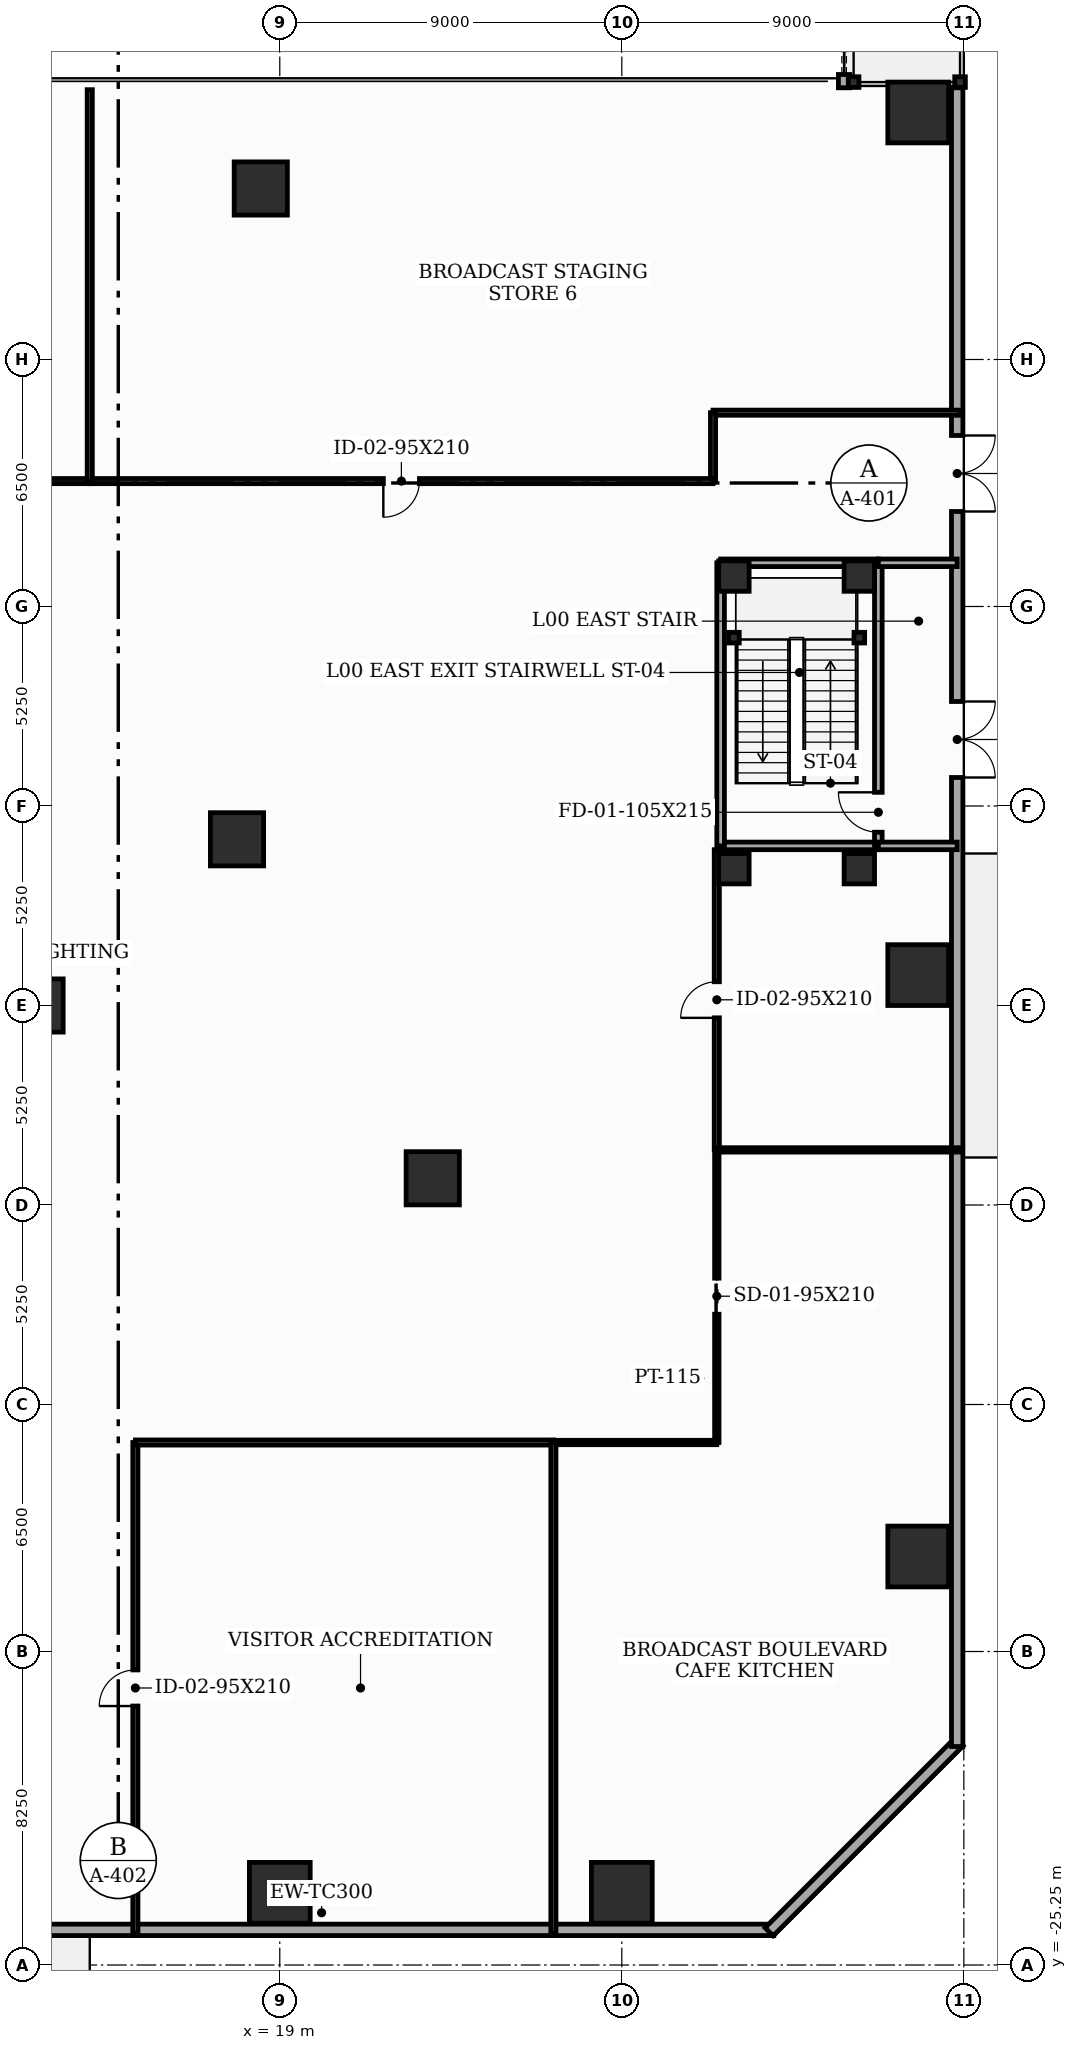
"""IFC4 building model, lengths in metres.
Left out: names, types, materials, properties, quantities, classifications, styles, units other than length and angle.
Written with IfcOpenShell. Run it as: python <this file> out.ifc"""

import sys

from ifc_helpers import new_model, si_unit, direction, frame, frame_2d, origin, origin_2d, place, context, subcontext, project, spatial, rectangle, i_section, extrude, element, fill, save


model = new_model("IFC4")
c1 = context("Model", 3, precision=1e-05, world=origin(), true_north=direction((0.0, 1.0)))
c2 = subcontext(c1, "Body", "Model", "MODEL_VIEW")
j1 = project(units=[si_unit("LENGTHUNIT", "METRE"), si_unit("PLANEANGLEUNIT", "RADIAN")], contexts=[c1])
p1 = place(None, origin())
s1 = spatial("IfcSite", under=j1, at=p1, CompositionType="ELEMENT")
p2 = place(p1, origin())
s2 = spatial("IfcBuilding", under=s1, at=p2, CompositionType="ELEMENT")
p3 = place(p2, origin())
s3 = spatial("IfcBuildingStorey", under=s2, at=p3, CompositionType="ELEMENT", Elevation=0.0)
p4 = place(p3, frame((12.6, 0.0, 0.0), z_axis=(0.0, 0.0, 1.0), x_axis=(1.0, 0.0, 0.0)))
e1 = element("IfcColumn", 1, at=p4, inside=s3, PredefinedType="COLUMN", context=c2, shape_type="SweptSolid", body=[
    extrude(rectangle(XDim=1.4, YDim=1.4, at=origin_2d()), origin(), (0.0, 0.0, 1.0), 5.2),
])
for number, where, z_axis, x_axis in (
    (2, (19.0, -23.35, 0.0), (0.0, 0.0, 1.0), (1.0, 0.0, 0.0)),
    (3, (28.0, -23.35, 0.0), (0.0, 0.0, 1.0), (1.0, 0.0, 0.0)),
    (4, (35.8, -14.5, 0.0), (0.0, 0.0, 1.0), (1.0, 0.0, 0.0)),
    (5, (35.8, 0.8, 0.0), (0.0, 0.0, 1.0), (1.0, 0.0, 0.0)),
    (6, (35.8, 23.5, 0.0), (0.0, 0.0, 1.0), (1.0, 0.0, 0.0)),
):
    element("IfcColumn", number, at=place(p3, frame(where, z_axis=z_axis, x_axis=x_axis)), inside=s3, PredefinedType="COLUMN", context=c2, shape_type="SweptSolid", body=[
        extrude(rectangle(XDim=1.6, YDim=1.6, at=origin_2d()), origin(), (0.0, 0.0, 1.0), 5.2),
    ])
for number, where, z_axis, x_axis in (
    (7, (18.5, 21.5, 0.0), (0.0, 0.0, 1.0), (1.0, 0.0, 0.0)),
    (8, (23.025, -4.547, 0.0), (0.0, 0.0, 1.0), (1.0, 0.0, 0.0)),
    (9, (17.875, 4.373, 0.0), (0.0, 0.0, 1.0), (1.0, 0.0, 0.0)),
):
    element("IfcColumn", number, at=place(p3, frame(where, z_axis=z_axis, x_axis=x_axis)), inside=s3, PredefinedType="COLUMN", context=c2, shape_type="SweptSolid", body=[
        extrude(rectangle(XDim=1.4, YDim=1.4, at=origin_2d()), origin(), (0.0, 0.0, 1.0), 5.2),
    ])
for number, where, z_axis, x_axis in (
    (10, (30.95, 3.6, 0.0), (0.0, 0.0, 1.0), (1.0, 0.0, 0.0)),
    (11, (34.25, 3.6, 0.0), (0.0, 0.0, 1.0), (1.0, 0.0, 0.0)),
    (12, (34.25, 11.3, 0.0), (0.0, 0.0, 1.0), (1.0, 0.0, 0.0)),
    (13, (30.95, 11.3, 0.0), (0.0, 0.0, 1.0), (1.0, 0.0, 0.0)),
):
    element("IfcColumn", number, at=place(p3, frame(where, z_axis=z_axis, x_axis=x_axis)), inside=s3, PredefinedType="COLUMN", context=c2, shape_type="SweptSolid", body=[
        extrude(rectangle(XDim=0.8, YDim=0.8, at=origin_2d()), origin(), (0.0, 0.0, 1.0), 5.2),
    ])
for number, where, z_axis, x_axis in (
    (14, (30.95, 9.68, 0.0), (0.0, 0.0, 1.0), (1.0, 0.0, 0.0)),
    (15, (34.25, 9.68, 0.0), (0.0, 0.0, 1.0), (1.0, 0.0, 0.0)),
):
    element("IfcColumn", number, at=place(p3, frame(where, z_axis=z_axis, x_axis=x_axis)), inside=s3, PredefinedType="PILASTER", context=c2, shape_type="SweptSolid", body=[
        extrude(i_section(OverallWidth=0.28, OverallDepth=0.28, WebThickness=0.01, FlangeThickness=0.018, at=origin_2d()), origin(), (0.0, 0.0, 1.0), 5.2),
    ])
for number, where, z_axis, x_axis in (
    (16, (34.1, 24.3, 0.0), (0.0, 0.0, 1.0), (1.0, 0.0, 0.0)),
    (17, (36.9, 24.3, 0.0), (0.0, 0.0, 1.0), (1.0, 0.0, 0.0)),
):
    element("IfcColumn", number, at=place(p3, frame(where, z_axis=z_axis, x_axis=x_axis)), inside=s3, PredefinedType="PILASTER", context=c2, shape_type="SweptSolid", body=[
        extrude(i_section(OverallWidth=0.28, OverallDepth=0.28, WebThickness=0.01, FlangeThickness=0.018, at=origin_2d()), origin(), (0.0, 0.0, 1.0), 4.4),
    ])
p5 = place(p3, frame((-32.0, -24.325, 0.0), z_axis=(0.0, 0.0, 1.0), x_axis=(1.0, 0.0, 0.0)))
e18 = element("IfcWall", 18, at=p5, inside=s3, PredefinedType="SOLIDWALL", context=c2, shape_type="SweptSolid", body=[
    extrude(rectangle(XDim=64.0, YDim=0.3, at=frame_2d((32.0, 0.0))), origin(), (0.0, 0.0, 1.0), 4.95),
])
p6 = place(p5, frame((8.5, 0.0, 0.0)))
e19 = element("IfcOpeningElement", 19, at=p6, cuts=e18, PredefinedType="OPENING", context=c2, shape_type="SweptSolid", body=[
    extrude(rectangle(XDim=2.0, YDim=2.2, at=frame_2d((1.0, 1.1))), frame((0.0, 0.16, 0.0), z_axis=(0.0, -1.0, 0.0), x_axis=(1.0, 0.0, 0.0)), (0.0, 0.0, 1.0), 0.32),
])
p7 = place(p5, frame((22.8, 0.0, 0.0)))
e20 = element("IfcOpeningElement", 20, at=p7, cuts=e18, PredefinedType="OPENING", context=c2, shape_type="SweptSolid", body=[
    extrude(rectangle(XDim=2.2, YDim=2.4, at=frame_2d((1.1, 1.2))), frame((0.0, 0.16, 0.0), z_axis=(0.0, -1.0, 0.0), x_axis=(1.0, 0.0, 0.0)), (0.0, 0.0, 1.0), 0.32),
])
p8 = place(p5, frame((30.4, 0.0, 0.0)))
e21 = element("IfcOpeningElement", 21, at=p8, cuts=e18, PredefinedType="OPENING", context=c2, shape_type="SweptSolid", body=[
    extrude(rectangle(XDim=2.2, YDim=2.4, at=frame_2d((1.1, 1.2))), frame((0.0, 0.16, 0.0), z_axis=(0.0, -1.0, 0.0), x_axis=(1.0, 0.0, 0.0)), (0.0, 0.0, 1.0), 0.32),
])
p9 = place(p5, frame((38.2, 0.0, 0.0)))
e22 = element("IfcOpeningElement", 22, at=p9, cuts=e18, PredefinedType="OPENING", context=c2, shape_type="SweptSolid", body=[
    extrude(rectangle(XDim=2.0, YDim=2.2, at=frame_2d((1.0, 1.1))), frame((0.0, 0.16, 0.0), z_axis=(0.0, -1.0, 0.0), x_axis=(1.0, 0.0, 0.0)), (0.0, 0.0, 1.0), 0.32),
])
p10 = place(p3, frame((31.876, -24.376, 0.0), z_axis=(0.0, 0.0, 1.0), x_axis=(0.707106781187, 0.707106781187, 0.0)))
e23 = element("IfcWall", 23, at=p10, inside=s3, PredefinedType="SOLIDWALL", context=c2, shape_type="SweptSolid", body=[
    extrude(rectangle(XDim=7.071, YDim=0.3, at=frame_2d((3.536, 0.0))), origin(), (0.0, 0.0, 1.0), 4.95),
])
p11 = place(p3, frame((36.825, -19.5, 0.0), z_axis=(0.0, 0.0, 1.0), x_axis=(0.0, 1.0, 0.0)))
e24 = element("IfcWall", 24, at=p11, inside=s3, PredefinedType="SOLIDWALL", context=c2, shape_type="SweptSolid", body=[
    extrude(rectangle(XDim=43.65, YDim=0.3, at=frame_2d((21.825, 0.0))), origin(), (0.0, 0.0, 1.0), 4.95),
])
p12 = place(p11, frame((32.5, 0.0, 0.0)))
e25 = element("IfcOpeningElement", 25, at=p12, cuts=e24, PredefinedType="OPENING", context=c2, shape_type="SweptSolid", body=[
    extrude(rectangle(XDim=2.0, YDim=2.2, at=frame_2d((1.0, 1.1))), frame((0.0, 0.16, 0.0), z_axis=(0.0, -1.0, 0.0), x_axis=(1.0, 0.0, 0.0)), (0.0, 0.0, 1.0), 0.32),
])
p13 = place(p11, frame((25.5, 0.0, 0.0)))
e26 = element("IfcOpeningElement", 26, at=p13, cuts=e24, PredefinedType="OPENING", context=c2, shape_type="SweptSolid", body=[
    extrude(rectangle(XDim=2.0, YDim=2.2, at=frame_2d((1.0, 1.1))), frame((0.0, 0.16, 0.0), z_axis=(0.0, -1.0, 0.0), x_axis=(1.0, 0.0, 0.0)), (0.0, 0.0, 1.0), 0.32),
])
p14 = place(p3, frame((33.85, 24.15, 0.0), z_axis=(0.0, 0.0, 1.0), x_axis=(0.0, 1.0, 0.0)))
e27 = element("IfcWall", 27, at=p14, inside=s3, PredefinedType="SOLIDWALL", context=c2, shape_type="SweptSolid", body=[
    extrude(rectangle(XDim=6.1, YDim=0.3, at=frame_2d((3.05, 0.0))), origin(), (0.0, 0.0, 1.0), 4.95),
])
p15 = place(p14, frame((0.35, 0.0, 0.0)))
e28 = element("IfcOpeningElement", 28, at=p15, cuts=e27, PredefinedType="OPENING", context=c2, shape_type="SweptSolid", body=[
    extrude(rectangle(XDim=5.4, YDim=2.8, at=frame_2d((2.7, 1.4))), frame((0.0, 0.16, 0.0), z_axis=(0.0, -1.0, 0.0), x_axis=(1.0, 0.0, 0.0)), (0.0, 0.0, 1.0), 0.32),
])
p16 = place(p3, frame((30.6, 4.2, 0.0), z_axis=(0.0, 0.0, 1.0), x_axis=(1.0, 0.0, 0.0)))
e29 = element("IfcWall", 29, at=p16, inside=s3, PredefinedType="SOLIDWALL", context=c2, shape_type="SweptSolid", body=[
    extrude(rectangle(XDim=4.15, YDim=0.2, at=frame_2d((2.075, 0.0))), origin(), (0.0, 0.0, 1.0), 4.95),
])
p17 = place(p3, frame((34.75, 4.2, 0.0), z_axis=(0.0, 0.0, 1.0), x_axis=(0.0, 1.0, 0.0)))
e30 = element("IfcWall", 30, at=p17, inside=s3, PredefinedType="SOLIDWALL", context=c2, shape_type="SweptSolid", body=[
    extrude(rectangle(XDim=7.45, YDim=0.2, at=frame_2d((3.725, 0.0))), origin(), (0.0, 0.0, 1.0), 4.95),
])
p18 = place(p17, frame((0.36, 0.0, 0.0)))
e31 = element("IfcOpeningElement", 31, at=p18, cuts=e30, PredefinedType="OPENING", context=c2, shape_type="SweptSolid", body=[
    extrude(rectangle(XDim=1.05, YDim=2.15, at=frame_2d((0.525, 1.075))), frame((0.0, 0.11, 0.0), z_axis=(0.0, -1.0, 0.0), x_axis=(1.0, 0.0, 0.0)), (0.0, 0.0, 1.0), 0.22),
])
p19 = place(p3, frame((34.75, 11.65, 0.0), z_axis=(0.0, 0.0, 1.0), x_axis=(-1.0, 0.0, 0.0)))
e32 = element("IfcWall", 32, at=p19, inside=s3, PredefinedType="SOLIDWALL", context=c2, shape_type="SweptSolid", body=[
    extrude(rectangle(XDim=4.15, YDim=0.2, at=frame_2d((2.075, 0.0))), origin(), (0.0, 0.0, 1.0), 4.95),
])
p20 = place(p3, frame((30.6, 11.65, 0.0), z_axis=(0.0, 0.0, 1.0), x_axis=(0.0, -1.0, 0.0)))
e33 = element("IfcWall", 33, at=p20, inside=s3, PredefinedType="SOLIDWALL", context=c2, shape_type="SweptSolid", body=[
    extrude(rectangle(XDim=7.45, YDim=0.2, at=frame_2d((3.725, 0.0))), origin(), (0.0, 0.0, 1.0), 4.95),
])
for number, where, z_axis, x_axis in (
    (34, (34.75, 4.2, 0.0), (0.0, 0.0, 1.0), (1.0, 0.0, 0.0)),
    (35, (36.825, 11.65, 0.0), (0.0, 0.0, 1.0), (-1.0, 0.0, 0.0)),
):
    element("IfcWall", number, at=place(p3, frame(where, z_axis=z_axis, x_axis=x_axis)), inside=s3, PredefinedType="SOLIDWALL", context=c2, shape_type="SweptSolid", body=[
        extrude(rectangle(XDim=2.075, YDim=0.2, at=frame_2d((1.038, 0.0))), origin(), (0.0, 0.0, 1.0), 4.235),
    ])
p21 = place(p3, frame((15.2, -24.42, 0.0), z_axis=(0.0, 0.0, 1.0), x_axis=(0.0, 1.0, 0.0)))
e36 = element("IfcWall", 36, at=p21, inside=s3, PredefinedType="PARTITIONING", context=c2, shape_type="SweptSolid", body=[
    extrude(rectangle(XDim=12.92, YDim=0.135, at=frame_2d((6.46, 0.0))), origin(), (0.0, 0.0, 1.0), 3.435),
])
p22 = place(p21, frame((5.985, 0.0, 0.0)))
e37 = element("IfcOpeningElement", 37, at=p22, cuts=e36, PredefinedType="OPENING", context=c2, shape_type="SweptSolid", body=[
    extrude(rectangle(XDim=0.95, YDim=2.1, at=frame_2d((0.475, 1.05))), frame((0.0, 0.077, 0.0), z_axis=(0.0, -1.0, 0.0), x_axis=(1.0, 0.0, 0.0)), (0.0, 0.0, 1.0), 0.155),
])
p23 = place(p3, frame((15.2, -11.5, 0.0), z_axis=(0.0, 0.0, 1.0), x_axis=(1.0, 0.0, 0.0)))
e38 = element("IfcWall", 38, at=p23, inside=s3, PredefinedType="PARTITIONING", context=c2, shape_type="SweptSolid", body=[
    extrude(rectangle(XDim=11.0, YDim=0.135, at=frame_2d((5.5, 0.0))), origin(), (0.0, 0.0, 1.0), 3.435),
])
p24 = place(p3, frame((26.2, -11.5, 0.0), z_axis=(0.0, 0.0, 1.0), x_axis=(1.0, 0.0, 0.0)))
e39 = element("IfcWall", 39, at=p24, inside=s3, PredefinedType="PARTITIONING", context=c2, shape_type="SweptSolid", body=[
    extrude(rectangle(XDim=4.3, YDim=0.115, at=frame_2d((2.15, 0.0))), origin(), (0.0, 0.0, 1.0), 4.485),
])
p25 = place(p3, frame((30.5, -11.5, 0.0), z_axis=(0.0, 0.0, 1.0), x_axis=(0.0, 1.0, 0.0)))
e40 = element("IfcWall", 40, at=p25, inside=s3, PredefinedType="PARTITIONING", context=c2, shape_type="SweptSolid", body=[
    extrude(rectangle(XDim=7.7, YDim=0.115, at=frame_2d((3.85, 0.0))), origin(), (0.0, 0.0, 1.0), 3.435),
])
p26 = place(p25, frame((3.375, 0.0, 0.0)))
e41 = element("IfcOpeningElement", 41, at=p26, cuts=e40, PredefinedType="OPENING", context=c2, shape_type="SweptSolid", body=[
    extrude(rectangle(XDim=0.95, YDim=2.1, at=frame_2d((0.475, 1.05))), frame((0.0, 0.067, 0.0), z_axis=(0.0, -1.0, 0.0), x_axis=(1.0, 0.0, 0.0)), (0.0, 0.0, 1.0), 0.135),
])
p27 = place(p3, frame((30.5, -3.8, 0.0), z_axis=(0.0, 0.0, 1.0), x_axis=(0.0, 1.0, 0.0)))
e42 = element("IfcWall", 42, at=p27, inside=s3, PredefinedType="PARTITIONING", context=c2, shape_type="SweptSolid", body=[
    extrude(rectangle(XDim=7.9, YDim=0.135, at=frame_2d((3.95, 0.0))), origin(), (0.0, 0.0, 1.0), 3.435),
])
p28 = place(p27, frame((3.475, 0.0, 0.0)))
e43 = element("IfcOpeningElement", 43, at=p28, cuts=e42, PredefinedType="OPENING", context=c2, shape_type="SweptSolid", body=[
    extrude(rectangle(XDim=0.95, YDim=2.1, at=frame_2d((0.475, 1.05))), frame((0.0, 0.077, 0.0), z_axis=(0.0, -1.0, 0.0), x_axis=(1.0, 0.0, 0.0)), (0.0, 0.0, 1.0), 0.155),
])
p29 = place(p3, frame((36.92, 15.6, 0.0), z_axis=(0.0, 0.0, 1.0), x_axis=(-1.0, 0.0, 0.0)))
e44 = element("IfcWall", 44, at=p29, inside=s3, PredefinedType="PARTITIONING", context=c2, shape_type="SweptSolid", body=[
    extrude(rectangle(XDim=6.52, YDim=0.135, at=frame_2d((3.26, 0.0))), origin(), (0.0, 0.0, 1.0), 4.235),
])
p30 = place(p3, frame((30.4, 15.6, 0.0), z_axis=(0.0, 0.0, 1.0), x_axis=(0.0, -1.0, 0.0)))
e45 = element("IfcWall", 45, at=p30, inside=s3, PredefinedType="PARTITIONING", context=c2, shape_type="SweptSolid", body=[
    extrude(rectangle(XDim=1.8, YDim=0.135, at=frame_2d((0.9, 0.0))), origin(), (0.0, 0.0, 1.0), 4.95),
])
p31 = place(p3, frame((30.4, 13.8, 0.0), z_axis=(0.0, 0.0, 1.0), x_axis=(-1.0, 0.0, 0.0)))
e46 = element("IfcWall", 46, at=p31, inside=s3, PredefinedType="PARTITIONING", context=c2, shape_type="SweptSolid", body=[
    extrude(rectangle(XDim=16.4, YDim=0.135, at=frame_2d((8.2, 0.0))), origin(), (0.0, 0.0, 1.0), 4.235),
])
p32 = place(p31, frame((7.725, 0.0, 0.0)))
e47 = element("IfcOpeningElement", 47, at=p32, cuts=e46, PredefinedType="OPENING", context=c2, shape_type="SweptSolid", body=[
    extrude(rectangle(XDim=0.95, YDim=2.1, at=frame_2d((0.475, 1.05))), frame((0.0, 0.077, 0.0), z_axis=(0.0, -1.0, 0.0), x_axis=(1.0, 0.0, 0.0)), (0.0, 0.0, 1.0), 0.155),
])
p33 = place(p3, frame((14.0, 13.8, 0.0), z_axis=(0.0, 0.0, 1.0), x_axis=(-1.0, 0.0, 0.0)))
e48 = element("IfcWall", 48, at=p33, inside=s3, PredefinedType="PARTITIONING", context=c2, shape_type="SweptSolid", body=[
    extrude(rectangle(XDim=33.5, YDim=0.135, at=frame_2d((16.75, 0.0))), origin(), (0.0, 0.0, 1.0), 3.435),
])
p34 = place(p33, frame((16.275, 0.0, 0.0)))
e49 = element("IfcOpeningElement", 49, at=p34, cuts=e48, PredefinedType="OPENING", context=c2, shape_type="SweptSolid", body=[
    extrude(rectangle(XDim=0.95, YDim=2.1, at=frame_2d((0.475, 1.05))), frame((0.0, 0.077, 0.0), z_axis=(0.0, -1.0, 0.0), x_axis=(1.0, 0.0, 0.0)), (0.0, 0.0, 1.0), 0.155),
])
p35 = place(p3, frame((26.2, -24.42, 0.0), z_axis=(0.0, 0.0, 1.0), x_axis=(0.0, 1.0, 0.0)))
e50 = element("IfcWall", 50, at=p35, inside=s3, PredefinedType="PARTITIONING", context=c2, shape_type="SweptSolid", body=[
    extrude(rectangle(XDim=12.92, YDim=0.135, at=frame_2d((6.46, 0.0))), origin(), (0.0, 0.0, 1.0), 3.435),
])
p36 = place(p3, frame((36.92, -3.8, 0.0), z_axis=(0.0, 0.0, 1.0), x_axis=(-1.0, 0.0, 0.0)))
e51 = element("IfcWall", 51, at=p36, inside=s3, PredefinedType="PARTITIONING", context=c2, shape_type="SweptSolid", body=[
    extrude(rectangle(XDim=6.42, YDim=0.115, at=frame_2d((3.21, 0.0))), origin(), (0.0, 0.0, 1.0), 4.235),
])
p37 = place(p3, frame((14.0, 24.1, 0.0), z_axis=(0.0, 0.0, 1.0), x_axis=(0.0, -1.0, 0.0)))
e52 = element("IfcWall", 52, at=p37, inside=s3, PredefinedType="PARTITIONING", context=c2, shape_type="SweptSolid", body=[
    extrude(rectangle(XDim=10.3, YDim=0.135, at=frame_2d((5.15, 0.0))), origin(), (0.0, 0.0, 1.0), 3.435),
])
p38 = place(p12, frame((2.0, 0.0, 0.0), z_axis=(0.0, 0.0, 1.0), x_axis=(-1.0, 0.0, 0.0)))
e53 = element("IfcDoor", 53, at=p38, inside=s3, OperationType="DOUBLE_DOOR_SINGLE_SWING", PredefinedType="DOOR", context=c2, shape_type="SweptSolid", body=[
    extrude(rectangle(XDim=2.0, YDim=2.2, at=frame_2d((1.0, 1.1))), frame((0.0, 0.025, 0.0), z_axis=(0.0, -1.0, 0.0), x_axis=(1.0, 0.0, 0.0)), (0.0, 0.0, 1.0), 0.05),
])
fill(e25, e53)
p39 = place(p13, frame((2.0, 0.0, 0.0), z_axis=(0.0, 0.0, 1.0), x_axis=(-1.0, 0.0, 0.0)))
e54 = element("IfcDoor", 54, at=p39, inside=s3, OperationType="DOUBLE_DOOR_SINGLE_SWING", PredefinedType="DOOR", context=c2, shape_type="SweptSolid", body=[
    extrude(rectangle(XDim=2.0, YDim=2.2, at=frame_2d((1.0, 1.1))), frame((0.0, 0.025, 0.0), z_axis=(0.0, -1.0, 0.0), x_axis=(1.0, 0.0, 0.0)), (0.0, 0.0, 1.0), 0.05),
])
fill(e26, e54)
p40 = place(p15, origin())
e55 = element("IfcDoor", 55, at=p40, inside=s3, OperationType="ROLLINGUP", PredefinedType="GATE", context=c2, shape_type="SweptSolid", body=[
    extrude(rectangle(XDim=5.4, YDim=2.8, at=frame_2d((2.7, 1.4))), frame((0.0, 0.025, 0.0), z_axis=(0.0, -1.0, 0.0), x_axis=(1.0, 0.0, 0.0)), (0.0, 0.0, 1.0), 0.05),
])
fill(e28, e55)
p41 = place(p18, origin())
e56 = element("IfcDoor", 56, at=p41, inside=s3, OperationType="SINGLE_SWING_RIGHT", PredefinedType="DOOR", context=c2, shape_type="SweptSolid", body=[
    extrude(rectangle(XDim=1.05, YDim=2.15, at=frame_2d((0.525, 1.075))), frame((0.0, 0.025, 0.0), z_axis=(0.0, -1.0, 0.0), x_axis=(1.0, 0.0, 0.0)), (0.0, 0.0, 1.0), 0.05),
])
fill(e31, e56)
p42 = place(p22, origin())
e57 = element("IfcDoor", 57, at=p42, inside=s3, OperationType="SINGLE_SWING_LEFT", PredefinedType="DOOR", context=c2, shape_type="SweptSolid", body=[
    extrude(rectangle(XDim=0.95, YDim=2.1, at=frame_2d((0.475, 1.05))), frame((0.0, 0.025, 0.0), z_axis=(0.0, -1.0, 0.0), x_axis=(1.0, 0.0, 0.0)), (0.0, 0.0, 1.0), 0.05),
])
fill(e37, e57)
p43 = place(p26, origin())
e58 = element("IfcDoor", 58, at=p43, inside=s3, OperationType="SLIDING_TO_LEFT", PredefinedType="DOOR", context=c2, shape_type="SweptSolid", body=[
    extrude(rectangle(XDim=0.95, YDim=2.1, at=frame_2d((0.475, 1.05))), frame((0.0, 0.025, 0.0), z_axis=(0.0, -1.0, 0.0), x_axis=(1.0, 0.0, 0.0)), (0.0, 0.0, 1.0), 0.05),
])
fill(e41, e58)
p44 = place(p28, origin())
e59 = element("IfcDoor", 59, at=p44, inside=s3, OperationType="SINGLE_SWING_LEFT", PredefinedType="DOOR", context=c2, shape_type="SweptSolid", body=[
    extrude(rectangle(XDim=0.95, YDim=2.1, at=frame_2d((0.475, 1.05))), frame((0.0, 0.025, 0.0), z_axis=(0.0, -1.0, 0.0), x_axis=(1.0, 0.0, 0.0)), (0.0, 0.0, 1.0), 0.05),
])
fill(e43, e59)
p45 = place(p32, origin())
e60 = element("IfcDoor", 60, at=p45, inside=s3, OperationType="SINGLE_SWING_RIGHT", PredefinedType="DOOR", context=c2, shape_type="SweptSolid", body=[
    extrude(rectangle(XDim=0.95, YDim=2.1, at=frame_2d((0.475, 1.05))), frame((0.0, 0.025, 0.0), z_axis=(0.0, -1.0, 0.0), x_axis=(1.0, 0.0, 0.0)), (0.0, 0.0, 1.0), 0.05),
])
fill(e47, e60)
save(model, sys.argv[1])
